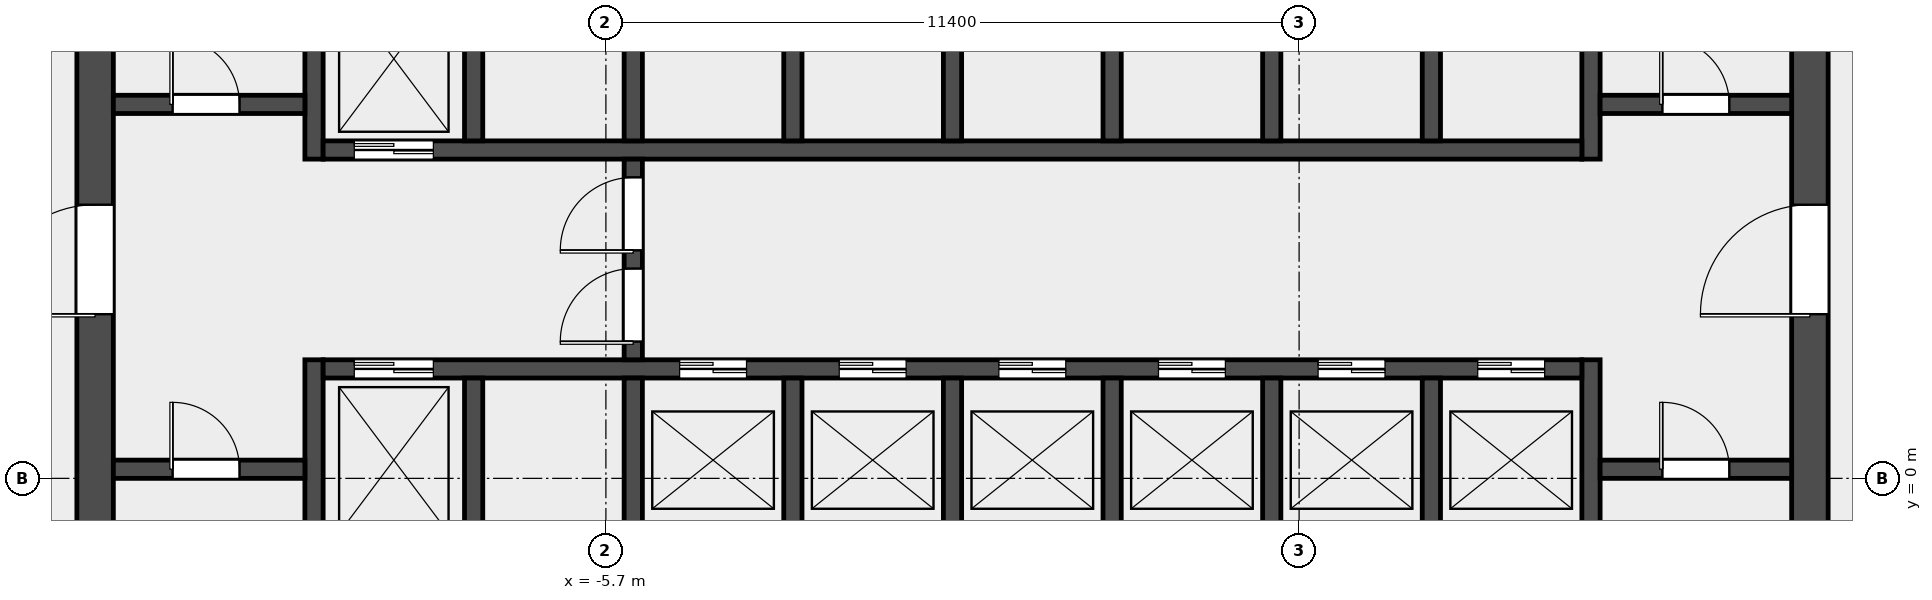
"""IFC4 building model, lengths in metres.
Left out: names, types, materials, properties, quantities, classifications, styles, units other than length and angle.
Written with IfcOpenShell. Run it as: python <this file> out.ifc"""

import sys

from ifc_helpers import new_model, si_unit, direction, frame, frame_2d, origin, place, context, subcontext, project, spatial, rectangle, extrude, element, fill, save


model = new_model("IFC4")
c1 = context("Model", 3, precision=1e-05, world=origin(), true_north=direction((0.0, 1.0)))
c2 = subcontext(c1, "Body", "Model", "MODEL_VIEW")
j1 = project(units=[si_unit("LENGTHUNIT", "METRE"), si_unit("PLANEANGLEUNIT", "RADIAN")], contexts=[c1])
p1 = place(None, origin())
s1 = spatial("IfcSite", under=j1, at=p1, CompositionType="ELEMENT")
p2 = place(p1, origin())
s2 = spatial("IfcBuilding", under=s1, at=p2, CompositionType="ELEMENT")
p3 = place(p2, frame((0.0, 0.0, 45.4)))
s3 = spatial("IfcBuildingStorey", under=s2, at=p3, CompositionType="ELEMENT", Elevation=45.4)
p4 = place(p3, frame((-14.1, -6.6, 0.0), z_axis=(0.0, 0.0, 1.0), x_axis=(0.0, 1.0, 0.0)))
e1 = element("IfcWall", 1, at=p4, inside=s3, PredefinedType="SHEAR", context=c2, shape_type="SweptSolid", body=[
    extrude(rectangle(XDim=19.5, YDim=0.6, at=frame_2d((9.75, 0.0))), origin(), (0.0, 0.0, 1.0), 4.5),
])
p5 = place(p4, frame((9.3, 0.0, 0.0)))
e2 = element("IfcOpeningElement", 2, at=p5, cuts=e1, PredefinedType="OPENING", context=c2, shape_type="SweptSolid", body=[
    extrude(rectangle(XDim=1.8, YDim=2.1, at=frame_2d((0.9, 1.05))), frame((0.0, 0.312, 0.0), z_axis=(0.0, -1.0, 0.0), x_axis=(1.0, 0.0, 0.0)), (0.0, 0.0, 1.0), 0.624),
])
p6 = place(p3, frame((14.1, -6.6, 0.0), z_axis=(0.0, 0.0, 1.0), x_axis=(0.0, 1.0, 0.0)))
e3 = element("IfcWall", 3, at=p6, inside=s3, PredefinedType="SHEAR", context=c2, shape_type="SweptSolid", body=[
    extrude(rectangle(XDim=19.5, YDim=0.6, at=frame_2d((9.75, 0.0))), origin(), (0.0, 0.0, 1.0), 4.5),
])
p7 = place(p6, frame((9.3, 0.0, 0.0)))
e4 = element("IfcOpeningElement", 4, at=p7, cuts=e3, PredefinedType="OPENING", context=c2, shape_type="SweptSolid", body=[
    extrude(rectangle(XDim=1.8, YDim=2.1, at=frame_2d((0.9, 1.05))), frame((0.0, 0.312, 0.0), z_axis=(0.0, -1.0, 0.0), x_axis=(1.0, 0.0, 0.0)), (0.0, 0.0, 1.0), 0.624),
])
p8 = place(p3, frame((-10.5, -6.6, 0.0), z_axis=(0.0, 0.0, 1.0), x_axis=(0.0, 1.0, 0.0)))
e5 = element("IfcWall", 5, at=p8, inside=s3, PredefinedType="SHEAR", context=c2, shape_type="SweptSolid", body=[
    extrude(rectangle(XDim=8.55, YDim=0.3, at=frame_2d((4.275, 0.0))), origin(), (0.0, 0.0, 1.0), 4.5),
])
p9 = place(p3, frame((-10.5, 5.25, 0.0), z_axis=(0.0, 0.0, 1.0), x_axis=(0.0, 1.0, 0.0)))
e6 = element("IfcWall", 6, at=p9, inside=s3, PredefinedType="SHEAR", context=c2, shape_type="SweptSolid", body=[
    extrude(rectangle(XDim=7.65, YDim=0.3, at=frame_2d((3.825, 0.0))), origin(), (0.0, 0.0, 1.0), 4.5),
])
p10 = place(p3, frame((10.5, -6.6, 0.0), z_axis=(0.0, 0.0, 1.0), x_axis=(0.0, 1.0, 0.0)))
e7 = element("IfcWall", 7, at=p10, inside=s3, PredefinedType="SHEAR", context=c2, shape_type="SweptSolid", body=[
    extrude(rectangle(XDim=8.55, YDim=0.3, at=frame_2d((4.275, 0.0))), origin(), (0.0, 0.0, 1.0), 4.5),
])
p11 = place(p3, frame((10.5, 5.25, 0.0), z_axis=(0.0, 0.0, 1.0), x_axis=(0.0, 1.0, 0.0)))
e8 = element("IfcWall", 8, at=p11, inside=s3, PredefinedType="SHEAR", context=c2, shape_type="SweptSolid", body=[
    extrude(rectangle(XDim=7.65, YDim=0.3, at=frame_2d((3.825, 0.0))), origin(), (0.0, 0.0, 1.0), 4.5),
])
p12 = place(p3, frame((-13.8, 0.15, 0.0), z_axis=(0.0, 0.0, 1.0), x_axis=(1.0, 0.0, 0.0)))
e9 = element("IfcWall", 9, at=p12, inside=s3, PredefinedType="SOLIDWALL", context=c2, shape_type="SweptSolid", body=[
    extrude(rectangle(XDim=3.15, YDim=0.3, at=frame_2d((1.575, 0.0))), origin(), (0.0, 0.0, 1.0), 4.5),
])
p13 = place(p12, frame((0.975, 0.0, 0.0)))
e10 = element("IfcOpeningElement", 10, at=p13, cuts=e9, PredefinedType="OPENING", context=c2, shape_type="SweptSolid", body=[
    extrude(rectangle(XDim=1.1, YDim=2.1, at=frame_2d((0.55, 1.05))), frame((0.0, 0.162, 0.0), z_axis=(0.0, -1.0, 0.0), x_axis=(1.0, 0.0, 0.0)), (0.0, 0.0, 1.0), 0.324),
])
p14 = place(p3, frame((-13.8, 6.15, 0.0), z_axis=(0.0, 0.0, 1.0), x_axis=(1.0, 0.0, 0.0)))
e11 = element("IfcWall", 11, at=p14, inside=s3, PredefinedType="SOLIDWALL", context=c2, shape_type="SweptSolid", body=[
    extrude(rectangle(XDim=3.15, YDim=0.3, at=frame_2d((1.575, 0.0))), origin(), (0.0, 0.0, 1.0), 4.5),
])
p15 = place(p14, frame((0.975, 0.0, 0.0)))
e12 = element("IfcOpeningElement", 12, at=p15, cuts=e11, PredefinedType="OPENING", context=c2, shape_type="SweptSolid", body=[
    extrude(rectangle(XDim=1.1, YDim=2.1, at=frame_2d((0.55, 1.05))), frame((0.0, 0.162, 0.0), z_axis=(0.0, -1.0, 0.0), x_axis=(1.0, 0.0, 0.0)), (0.0, 0.0, 1.0), 0.324),
])
p16 = place(p3, frame((10.65, 0.15, 0.0), z_axis=(0.0, 0.0, 1.0), x_axis=(1.0, 0.0, 0.0)))
e13 = element("IfcWall", 13, at=p16, inside=s3, PredefinedType="SOLIDWALL", context=c2, shape_type="SweptSolid", body=[
    extrude(rectangle(XDim=3.15, YDim=0.3, at=frame_2d((1.575, 0.0))), origin(), (0.0, 0.0, 1.0), 4.5),
])
p17 = place(p16, frame((1.025, 0.0, 0.0)))
e14 = element("IfcOpeningElement", 14, at=p17, cuts=e13, PredefinedType="OPENING", context=c2, shape_type="SweptSolid", body=[
    extrude(rectangle(XDim=1.1, YDim=2.1, at=frame_2d((0.55, 1.05))), frame((0.0, 0.162, 0.0), z_axis=(0.0, -1.0, 0.0), x_axis=(1.0, 0.0, 0.0)), (0.0, 0.0, 1.0), 0.324),
])
p18 = place(p3, frame((10.65, 6.15, 0.0), z_axis=(0.0, 0.0, 1.0), x_axis=(1.0, 0.0, 0.0)))
e15 = element("IfcWall", 15, at=p18, inside=s3, PredefinedType="SOLIDWALL", context=c2, shape_type="SweptSolid", body=[
    extrude(rectangle(XDim=3.15, YDim=0.3, at=frame_2d((1.575, 0.0))), origin(), (0.0, 0.0, 1.0), 4.5),
])
p19 = place(p18, frame((1.025, 0.0, 0.0)))
e16 = element("IfcOpeningElement", 16, at=p19, cuts=e15, PredefinedType="OPENING", context=c2, shape_type="SweptSolid", body=[
    extrude(rectangle(XDim=1.1, YDim=2.1, at=frame_2d((0.55, 1.05))), frame((0.0, 0.162, 0.0), z_axis=(0.0, -1.0, 0.0), x_axis=(1.0, 0.0, 0.0)), (0.0, 0.0, 1.0), 0.324),
])
p20 = place(p3, frame((-10.35, 1.8, 0.0), z_axis=(0.0, 0.0, 1.0), x_axis=(1.0, 0.0, 0.0)))
e17 = element("IfcWall", 17, at=p20, inside=s3, PredefinedType="SOLIDWALL", context=c2, shape_type="SweptSolid", body=[
    extrude(rectangle(XDim=20.7, YDim=0.3, at=frame_2d((10.35, 0.0))), origin(), (0.0, 0.0, 1.0), 4.5),
])
p21 = place(p20, frame((0.512, 0.0, 0.0)))
e18 = element("IfcOpeningElement", 18, at=p21, cuts=e17, PredefinedType="OPENING", context=c2, shape_type="SweptSolid", body=[
    extrude(rectangle(XDim=1.3, YDim=2.1, at=frame_2d((0.65, 1.05))), frame((0.0, 0.162, 0.0), z_axis=(0.0, -1.0, 0.0), x_axis=(1.0, 0.0, 0.0)), (0.0, 0.0, 1.0), 0.324),
])
p22 = place(p20, frame((5.863, 0.0, 0.0)))
e19 = element("IfcOpeningElement", 19, at=p22, cuts=e17, PredefinedType="OPENING", context=c2, shape_type="SweptSolid", body=[
    extrude(rectangle(XDim=1.1, YDim=2.1, at=frame_2d((0.55, 1.05))), frame((0.0, 0.162, 0.0), z_axis=(0.0, -1.0, 0.0), x_axis=(1.0, 0.0, 0.0)), (0.0, 0.0, 1.0), 0.324),
])
p23 = place(p20, frame((8.488, 0.0, 0.0)))
e20 = element("IfcOpeningElement", 20, at=p23, cuts=e17, PredefinedType="OPENING", context=c2, shape_type="SweptSolid", body=[
    extrude(rectangle(XDim=1.1, YDim=2.1, at=frame_2d((0.55, 1.05))), frame((0.0, 0.162, 0.0), z_axis=(0.0, -1.0, 0.0), x_axis=(1.0, 0.0, 0.0)), (0.0, 0.0, 1.0), 0.324),
])
p24 = place(p20, frame((11.113, 0.0, 0.0)))
e21 = element("IfcOpeningElement", 21, at=p24, cuts=e17, PredefinedType="OPENING", context=c2, shape_type="SweptSolid", body=[
    extrude(rectangle(XDim=1.1, YDim=2.1, at=frame_2d((0.55, 1.05))), frame((0.0, 0.162, 0.0), z_axis=(0.0, -1.0, 0.0), x_axis=(1.0, 0.0, 0.0)), (0.0, 0.0, 1.0), 0.324),
])
p25 = place(p20, frame((13.738, 0.0, 0.0)))
e22 = element("IfcOpeningElement", 22, at=p25, cuts=e17, PredefinedType="OPENING", context=c2, shape_type="SweptSolid", body=[
    extrude(rectangle(XDim=1.1, YDim=2.1, at=frame_2d((0.55, 1.05))), frame((0.0, 0.162, 0.0), z_axis=(0.0, -1.0, 0.0), x_axis=(1.0, 0.0, 0.0)), (0.0, 0.0, 1.0), 0.324),
])
p26 = place(p20, frame((16.363, 0.0, 0.0)))
e23 = element("IfcOpeningElement", 23, at=p26, cuts=e17, PredefinedType="OPENING", context=c2, shape_type="SweptSolid", body=[
    extrude(rectangle(XDim=1.1, YDim=2.1, at=frame_2d((0.55, 1.05))), frame((0.0, 0.162, 0.0), z_axis=(0.0, -1.0, 0.0), x_axis=(1.0, 0.0, 0.0)), (0.0, 0.0, 1.0), 0.324),
])
p27 = place(p20, frame((18.988, 0.0, 0.0)))
e24 = element("IfcOpeningElement", 24, at=p27, cuts=e17, PredefinedType="OPENING", context=c2, shape_type="SweptSolid", body=[
    extrude(rectangle(XDim=1.1, YDim=2.1, at=frame_2d((0.55, 1.05))), frame((0.0, 0.162, 0.0), z_axis=(0.0, -1.0, 0.0), x_axis=(1.0, 0.0, 0.0)), (0.0, 0.0, 1.0), 0.324),
])
p28 = place(p3, frame((-10.35, 5.4, 0.0), z_axis=(0.0, 0.0, 1.0), x_axis=(1.0, 0.0, 0.0)))
e25 = element("IfcWall", 25, at=p28, inside=s3, PredefinedType="SOLIDWALL", context=c2, shape_type="SweptSolid", body=[
    extrude(rectangle(XDim=20.7, YDim=0.3, at=frame_2d((10.35, 0.0))), origin(), (0.0, 0.0, 1.0), 4.5),
])
p29 = place(p28, frame((0.512, 0.0, 0.0)))
e26 = element("IfcOpeningElement", 26, at=p29, cuts=e25, PredefinedType="OPENING", context=c2, shape_type="SweptSolid", body=[
    extrude(rectangle(XDim=1.3, YDim=2.1, at=frame_2d((0.65, 1.05))), frame((0.0, 0.162, 0.0), z_axis=(0.0, -1.0, 0.0), x_axis=(1.0, 0.0, 0.0)), (0.0, 0.0, 1.0), 0.324),
])
for number, where, z_axis, x_axis in (
    (27, (-7.875, -1.05, 0.0), (0.0, 0.0, 1.0), (0.0, 1.0, 0.0)),
    (28, (-5.25, -1.05, 0.0), (0.0, 0.0, 1.0), (0.0, 1.0, 0.0)),
    (29, (-2.625, -1.05, 0.0), (0.0, 0.0, 1.0), (0.0, 1.0, 0.0)),
    (30, (0.0, -1.05, 0.0), (0.0, 0.0, 1.0), (0.0, 1.0, 0.0)),
    (31, (2.625, -1.05, 0.0), (0.0, 0.0, 1.0), (0.0, 1.0, 0.0)),
    (32, (5.25, -1.05, 0.0), (0.0, 0.0, 1.0), (0.0, 1.0, 0.0)),
    (33, (7.875, -1.05, 0.0), (0.0, 0.0, 1.0), (0.0, 1.0, 0.0)),
    (34, (-7.875, 5.55, 0.0), (0.0, 0.0, 1.0), (0.0, 1.0, 0.0)),
    (35, (-5.25, 5.55, 0.0), (0.0, 0.0, 1.0), (0.0, 1.0, 0.0)),
    (36, (-2.625, 5.55, 0.0), (0.0, 0.0, 1.0), (0.0, 1.0, 0.0)),
    (37, (0.0, 5.55, 0.0), (0.0, 0.0, 1.0), (0.0, 1.0, 0.0)),
    (38, (2.625, 5.55, 0.0), (0.0, 0.0, 1.0), (0.0, 1.0, 0.0)),
    (39, (5.25, 5.55, 0.0), (0.0, 0.0, 1.0), (0.0, 1.0, 0.0)),
    (40, (7.875, 5.55, 0.0), (0.0, 0.0, 1.0), (0.0, 1.0, 0.0)),
):
    element("IfcWall", number, at=place(p3, frame(where, z_axis=z_axis, x_axis=x_axis)), inside=s3, PredefinedType="SOLIDWALL", context=c2, shape_type="SweptSolid", body=[
        extrude(rectangle(XDim=2.7, YDim=0.3, at=frame_2d((1.35, 0.0))), origin(), (0.0, 0.0, 1.0), 4.5),
    ])
p30 = place(p3, frame((-5.25, 1.95, 0.0), z_axis=(0.0, 0.0, 1.0), x_axis=(0.0, 1.0, 0.0)))
e41 = element("IfcWall", 41, at=p30, inside=s3, PredefinedType="SOLIDWALL", context=c2, shape_type="SweptSolid", body=[
    extrude(rectangle(XDim=3.3, YDim=0.3, at=frame_2d((1.65, 0.0))), origin(), (0.0, 0.0, 1.0), 4.5),
])
p31 = place(p30, frame((0.3, 0.0, 0.0)))
e42 = element("IfcOpeningElement", 42, at=p31, cuts=e41, PredefinedType="OPENING", context=c2, shape_type="SweptSolid", body=[
    extrude(rectangle(XDim=1.2, YDim=2.1, at=frame_2d((0.6, 1.05))), frame((0.0, 0.162, 0.0), z_axis=(0.0, -1.0, 0.0), x_axis=(1.0, 0.0, 0.0)), (0.0, 0.0, 1.0), 0.324),
])
p32 = place(p30, frame((1.8, 0.0, 0.0)))
e43 = element("IfcOpeningElement", 43, at=p32, cuts=e41, PredefinedType="OPENING", context=c2, shape_type="SweptSolid", body=[
    extrude(rectangle(XDim=1.2, YDim=2.1, at=frame_2d((0.6, 1.05))), frame((0.0, 0.162, 0.0), z_axis=(0.0, -1.0, 0.0), x_axis=(1.0, 0.0, 0.0)), (0.0, 0.0, 1.0), 0.324),
])
p33 = place(p13, origin())
e44 = element("IfcDoor", 44, at=p33, inside=s3, OperationType="SINGLE_SWING_LEFT", PredefinedType="DOOR", context=c2, shape_type="SweptSolid", body=[
    extrude(rectangle(XDim=1.1, YDim=2.1, at=frame_2d((0.55, 1.05))), frame((0.0, 0.025, 0.0), z_axis=(0.0, -1.0, 0.0), x_axis=(1.0, 0.0, 0.0)), (0.0, 0.0, 1.0), 0.05),
])
fill(e10, e44)
p34 = place(p15, origin())
e45 = element("IfcDoor", 45, at=p34, inside=s3, OperationType="SINGLE_SWING_LEFT", PredefinedType="DOOR", context=c2, shape_type="SweptSolid", body=[
    extrude(rectangle(XDim=1.1, YDim=2.1, at=frame_2d((0.55, 1.05))), frame((0.0, 0.025, 0.0), z_axis=(0.0, -1.0, 0.0), x_axis=(1.0, 0.0, 0.0)), (0.0, 0.0, 1.0), 0.05),
])
fill(e12, e45)
p35 = place(p17, origin())
e46 = element("IfcDoor", 46, at=p35, inside=s3, OperationType="SINGLE_SWING_RIGHT", PredefinedType="DOOR", context=c2, shape_type="SweptSolid", body=[
    extrude(rectangle(XDim=1.1, YDim=2.1, at=frame_2d((0.55, 1.05))), frame((0.0, 0.025, 0.0), z_axis=(0.0, -1.0, 0.0), x_axis=(1.0, 0.0, 0.0)), (0.0, 0.0, 1.0), 0.05),
])
fill(e14, e46)
p36 = place(p19, origin())
e47 = element("IfcDoor", 47, at=p36, inside=s3, OperationType="SINGLE_SWING_RIGHT", PredefinedType="DOOR", context=c2, shape_type="SweptSolid", body=[
    extrude(rectangle(XDim=1.1, YDim=2.1, at=frame_2d((0.55, 1.05))), frame((0.0, 0.025, 0.0), z_axis=(0.0, -1.0, 0.0), x_axis=(1.0, 0.0, 0.0)), (0.0, 0.0, 1.0), 0.05),
])
fill(e16, e47)
p37 = place(p5, origin())
e48 = element("IfcDoor", 48, at=p37, inside=s3, OperationType="DOUBLE_DOOR_SINGLE_SWING", PredefinedType="DOOR", context=c2, shape_type="SweptSolid", body=[
    extrude(rectangle(XDim=1.8, YDim=2.1, at=frame_2d((0.9, 1.05))), frame((0.0, 0.025, 0.0), z_axis=(0.0, -1.0, 0.0), x_axis=(1.0, 0.0, 0.0)), (0.0, 0.0, 1.0), 0.05),
])
fill(e2, e48)
p38 = place(p7, origin())
e49 = element("IfcDoor", 49, at=p38, inside=s3, OperationType="DOUBLE_DOOR_SINGLE_SWING", PredefinedType="DOOR", context=c2, shape_type="SweptSolid", body=[
    extrude(rectangle(XDim=1.8, YDim=2.1, at=frame_2d((0.9, 1.05))), frame((0.0, 0.025, 0.0), z_axis=(0.0, -1.0, 0.0), x_axis=(1.0, 0.0, 0.0)), (0.0, 0.0, 1.0), 0.05),
])
fill(e4, e49)
p39 = place(p31, origin())
e50 = element("IfcDoor", 50, at=p39, inside=s3, OperationType="SINGLE_SWING_LEFT", PredefinedType="DOOR", context=c2, shape_type="SweptSolid", body=[
    extrude(rectangle(XDim=1.2, YDim=2.1, at=frame_2d((0.6, 1.05))), frame((0.0, 0.025, 0.0), z_axis=(0.0, -1.0, 0.0), x_axis=(1.0, 0.0, 0.0)), (0.0, 0.0, 1.0), 0.05),
])
fill(e42, e50)
p40 = place(p32, origin())
e51 = element("IfcDoor", 51, at=p40, inside=s3, OperationType="SINGLE_SWING_RIGHT", PredefinedType="DOOR", context=c2, shape_type="SweptSolid", body=[
    extrude(rectangle(XDim=1.2, YDim=2.1, at=frame_2d((0.6, 1.05))), frame((0.0, 0.025, 0.0), z_axis=(0.0, -1.0, 0.0), x_axis=(1.0, 0.0, 0.0)), (0.0, 0.0, 1.0), 0.05),
])
fill(e43, e51)
p41 = place(p21, origin())
e52 = element("IfcDoor", 52, at=p41, inside=s3, OperationType="DOUBLE_DOOR_SLIDING", PredefinedType="DOOR", context=c2, shape_type="SweptSolid", body=[
    extrude(rectangle(XDim=1.3, YDim=2.1, at=frame_2d((0.65, 1.05))), frame((0.0, 0.025, 0.0), z_axis=(0.0, -1.0, 0.0), x_axis=(1.0, 0.0, 0.0)), (0.0, 0.0, 1.0), 0.05),
])
fill(e18, e52)
p42 = place(p22, origin())
e53 = element("IfcDoor", 53, at=p42, inside=s3, OperationType="DOUBLE_DOOR_SLIDING", PredefinedType="DOOR", context=c2, shape_type="SweptSolid", body=[
    extrude(rectangle(XDim=1.1, YDim=2.1, at=frame_2d((0.55, 1.05))), frame((0.0, 0.025, 0.0), z_axis=(0.0, -1.0, 0.0), x_axis=(1.0, 0.0, 0.0)), (0.0, 0.0, 1.0), 0.05),
])
fill(e19, e53)
p43 = place(p23, origin())
e54 = element("IfcDoor", 54, at=p43, inside=s3, OperationType="DOUBLE_DOOR_SLIDING", PredefinedType="DOOR", context=c2, shape_type="SweptSolid", body=[
    extrude(rectangle(XDim=1.1, YDim=2.1, at=frame_2d((0.55, 1.05))), frame((0.0, 0.025, 0.0), z_axis=(0.0, -1.0, 0.0), x_axis=(1.0, 0.0, 0.0)), (0.0, 0.0, 1.0), 0.05),
])
fill(e20, e54)
p44 = place(p24, origin())
e55 = element("IfcDoor", 55, at=p44, inside=s3, OperationType="DOUBLE_DOOR_SLIDING", PredefinedType="DOOR", context=c2, shape_type="SweptSolid", body=[
    extrude(rectangle(XDim=1.1, YDim=2.1, at=frame_2d((0.55, 1.05))), frame((0.0, 0.025, 0.0), z_axis=(0.0, -1.0, 0.0), x_axis=(1.0, 0.0, 0.0)), (0.0, 0.0, 1.0), 0.05),
])
fill(e21, e55)
p45 = place(p25, origin())
e56 = element("IfcDoor", 56, at=p45, inside=s3, OperationType="DOUBLE_DOOR_SLIDING", PredefinedType="DOOR", context=c2, shape_type="SweptSolid", body=[
    extrude(rectangle(XDim=1.1, YDim=2.1, at=frame_2d((0.55, 1.05))), frame((0.0, 0.025, 0.0), z_axis=(0.0, -1.0, 0.0), x_axis=(1.0, 0.0, 0.0)), (0.0, 0.0, 1.0), 0.05),
])
fill(e22, e56)
p46 = place(p26, origin())
e57 = element("IfcDoor", 57, at=p46, inside=s3, OperationType="DOUBLE_DOOR_SLIDING", PredefinedType="DOOR", context=c2, shape_type="SweptSolid", body=[
    extrude(rectangle(XDim=1.1, YDim=2.1, at=frame_2d((0.55, 1.05))), frame((0.0, 0.025, 0.0), z_axis=(0.0, -1.0, 0.0), x_axis=(1.0, 0.0, 0.0)), (0.0, 0.0, 1.0), 0.05),
])
fill(e23, e57)
p47 = place(p27, origin())
e58 = element("IfcDoor", 58, at=p47, inside=s3, OperationType="DOUBLE_DOOR_SLIDING", PredefinedType="DOOR", context=c2, shape_type="SweptSolid", body=[
    extrude(rectangle(XDim=1.1, YDim=2.1, at=frame_2d((0.55, 1.05))), frame((0.0, 0.025, 0.0), z_axis=(0.0, -1.0, 0.0), x_axis=(1.0, 0.0, 0.0)), (0.0, 0.0, 1.0), 0.05),
])
fill(e24, e58)
p48 = place(p29, origin())
e59 = element("IfcDoor", 59, at=p48, inside=s3, OperationType="DOUBLE_DOOR_SLIDING", PredefinedType="DOOR", context=c2, shape_type="SweptSolid", body=[
    extrude(rectangle(XDim=1.3, YDim=2.1, at=frame_2d((0.65, 1.05))), frame((0.0, 0.025, 0.0), z_axis=(0.0, -1.0, 0.0), x_axis=(1.0, 0.0, 0.0)), (0.0, 0.0, 1.0), 0.05),
])
fill(e26, e59)
save(model, sys.argv[1])
